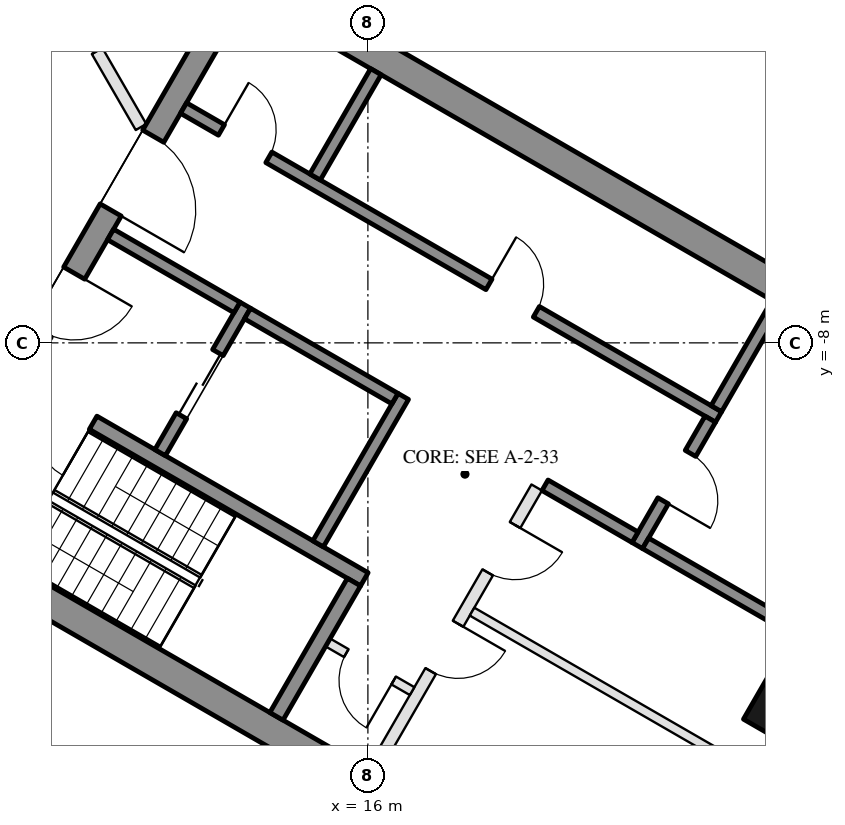
"""IFC4 building model, lengths in metres.
Left out: names, types, materials, properties, quantities, classifications, styles, units other than length and angle.
Written with IfcOpenShell. Run it as: python <this file> out.ifc"""

import sys

from ifc_helpers import new_model, si_unit, direction, frame, frame_2d, origin, origin_2d, place, context, subcontext, project, spatial, rectangle, hollow_rectangle, extrude, element, fill, save


model = new_model("IFC4")
c1 = context("Model", 3, precision=1e-05, world=origin(), true_north=direction((0.0, 1.0)))
c2 = subcontext(c1, "Body", "Model", "MODEL_VIEW")
j1 = project(units=[si_unit("LENGTHUNIT", "METRE"), si_unit("PLANEANGLEUNIT", "RADIAN")], contexts=[c1])
p1 = place(None, origin())
s1 = spatial("IfcSite", under=j1, at=p1, CompositionType="ELEMENT")
p2 = place(p1, origin())
s2 = spatial("IfcBuilding", under=s1, at=p2, CompositionType="ELEMENT")
p3 = place(p2, frame((0.0, 0.0, 146.6)))
s3 = spatial("IfcBuildingStorey", under=s2, at=p3, CompositionType="ELEMENT", Elevation=146.6)
p4 = place(p3, frame((23.729, -13.7, 0.0), z_axis=(0.0, 0.0, 1.0), x_axis=(0.5, 0.866025403784, 0.0)))
e1 = element("IfcColumn", 1, at=p4, inside=s3, PredefinedType="COLUMN", context=c2, shape_type="SweptSolid", body=[
    extrude(hollow_rectangle(XDim=2.4, YDim=2.2, WallThickness=0.06, at=origin_2d()), origin(), (0.0, 0.0, 1.0), 3.7),
])
p5 = place(p3, frame((26.257, -6.567, 0.0), z_axis=(0.0, 0.0, 1.0), x_axis=(-0.500023526245, 0.866011820475, 0.0)))
e2 = element("IfcWall", 2, at=p5, inside=s3, PredefinedType="SOLIDWALL", context=c2, shape_type="SweptSolid", body=[
    extrude(rectangle(XDim=11.816, YDim=0.35, at=frame_2d((5.908, 0.0))), origin(), (0.0, 0.0, 1.0), 3.55),
])
p6 = place(p5, frame((0.38, 0.0, 0.3)))
e3 = element("IfcOpeningElement", 3, at=p6, cuts=e2, PredefinedType="OPENING", context=c2, shape_type="SweptSolid", body=[
    extrude(rectangle(XDim=1.8, YDim=2.65, at=frame_2d((0.9, 1.325))), frame((0.0, 0.185, 0.0), z_axis=(0.0, -1.0, 0.0), x_axis=(1.0, 0.0, 0.0)), (0.0, 0.0, 1.0), 0.37),
])
p7 = place(p5, frame((7.741, 0.0, 0.0)))
e4 = element("IfcOpeningElement", 4, at=p7, cuts=e2, PredefinedType="OPENING", context=c2, shape_type="SweptSolid", body=[
    extrude(rectangle(XDim=2.4, YDim=2.4, at=frame_2d((1.2, 1.2))), frame((0.0, 0.185, 0.0), z_axis=(0.0, -1.0, 0.0), x_axis=(1.0, 0.0, 0.0)), (0.0, 0.0, 1.0), 0.37),
])
p8 = place(p5, frame((3.791, 0.0, 0.3)))
e5 = element("IfcOpeningElement", 5, at=p8, cuts=e2, PredefinedType="OPENING", context=c2, shape_type="SweptSolid", body=[
    extrude(rectangle(XDim=1.6, YDim=2.65, at=frame_2d((0.8, 1.325))), frame((0.0, 0.185, 0.0), z_axis=(0.0, -1.0, 0.0), x_axis=(1.0, 0.0, 0.0)), (0.0, 0.0, 1.0), 0.37),
])
p9 = place(p5, frame((5.691, 0.0, 0.3)))
e6 = element("IfcOpeningElement", 6, at=p9, cuts=e2, PredefinedType="OPENING", context=c2, shape_type="SweptSolid", body=[
    extrude(rectangle(XDim=1.6, YDim=2.65, at=frame_2d((0.8, 1.325))), frame((0.0, 0.185, 0.0), z_axis=(0.0, -1.0, 0.0), x_axis=(1.0, 0.0, 0.0)), (0.0, 0.0, 1.0), 0.37),
])
for number, where, z_axis, x_axis in (
    (7, (8.547, -10.997, 0.0), (0.0, 0.0, 1.0), (0.866, -0.5, 0.0)),
    (8, (13.797, -1.903, 0.0), (0.0, 0.0, 1.0), (0.866, -0.5, 0.0)),
):
    element("IfcWall", number, at=place(p3, frame(where, z_axis=z_axis, x_axis=x_axis)), inside=s3, PredefinedType="SHEAR", context=c2, shape_type="SweptSolid", body=[
        extrude(rectangle(XDim=14.837, YDim=0.5, at=frame_2d((7.418, 0.0))), origin(), (0.0, 0.0, 1.0), 3.5),
    ])
p10 = place(p3, frame((8.845, -10.88, 0.0), z_axis=(0.0, 0.0, 1.0), x_axis=(0.500004234368, 0.866022959057, 0.0)))
e9 = element("IfcWall", 9, at=p10, inside=s3, PredefinedType="SHEAR", context=c2, shape_type="SweptSolid", body=[
    extrude(rectangle(XDim=10.0, YDim=0.4, at=frame_2d((5.0, 0.0))), origin(), (0.0, 0.0, 1.0), 3.5),
])
p11 = place(p10, frame((3.55, 0.0, 0.0)))
e10 = element("IfcOpeningElement", 10, at=p11, cuts=e9, PredefinedType="OPENING", context=c2, shape_type="SweptSolid", body=[
    extrude(rectangle(XDim=1.1, YDim=2.1, at=frame_2d((0.55, 1.05))), frame((0.0, 0.21, 0.0), z_axis=(0.0, -1.0, 0.0), x_axis=(1.0, 0.0, 0.0)), (0.0, 0.0, 1.0), 0.42),
])
p12 = place(p10, frame((5.85, 0.0, 0.0)))
e11 = element("IfcOpeningElement", 11, at=p12, cuts=e9, PredefinedType="OPENING", context=c2, shape_type="SweptSolid", body=[
    extrude(rectangle(XDim=1.4, YDim=2.1, at=frame_2d((0.7, 1.05))), frame((0.0, 0.21, 0.0), z_axis=(0.0, -1.0, 0.0), x_axis=(1.0, 0.0, 0.0)), (0.0, 0.0, 1.0), 0.42),
])
p13 = place(p3, frame((10.356, -8.664, 0.0), z_axis=(0.0, 0.0, 1.0), x_axis=(0.866028629588, -0.499994412703, 0.0)))
e12 = element("IfcWall", 12, at=p13, inside=s3, PredefinedType="SHEAR", context=c2, shape_type="SweptSolid", body=[
    extrude(rectangle(XDim=6.45, YDim=0.25, at=frame_2d((3.225, 0.0))), origin(), (0.0, 0.0, 1.0), 3.5),
])
p14 = place(p13, frame((0.3, 0.0, 0.0)))
e13 = element("IfcOpeningElement", 13, at=p14, cuts=e12, PredefinedType="OPENING", context=c2, shape_type="SweptSolid", body=[
    extrude(rectangle(XDim=1.0, YDim=2.1, at=frame_2d((0.5, 1.05))), frame((0.0, 0.135, 0.0), z_axis=(0.0, -1.0, 0.0), x_axis=(1.0, 0.0, 0.0)), (0.0, 0.0, 1.0), 0.27),
])
p15 = place(p3, frame((14.496, -14.143, 0.0), z_axis=(0.0, 0.0, 1.0), x_axis=(0.500062241894, 0.865989465428, 0.0)))
e14 = element("IfcWall", 14, at=p15, inside=s3, PredefinedType="SHEAR", context=c2, shape_type="SweptSolid", body=[
    extrude(rectangle(XDim=2.55, YDim=0.25, at=frame_2d((1.275, 0.0))), origin(), (0.0, 0.0, 1.0), 3.5),
])
p16 = place(p3, frame((15.181, -11.305, 0.0), z_axis=(0.0, 0.0, 1.0), x_axis=(0.49994636267, 0.866056369097, 0.0)))
e15 = element("IfcWall", 15, at=p16, inside=s3, PredefinedType="SHEAR", context=c2, shape_type="SweptSolid", body=[
    extrude(rectangle(XDim=2.8, YDim=0.2, at=frame_2d((1.4, 0.0))), origin(), (0.0, 0.0, 1.0), 3.5),
])
p17 = place(p3, frame((12.583, -9.805, 0.0), z_axis=(0.0, 0.0, 1.0), x_axis=(0.49994636267, 0.866056369097, 0.0)))
e16 = element("IfcWall", 16, at=p17, inside=s3, PredefinedType="SHEAR", context=c2, shape_type="SweptSolid", body=[
    extrude(rectangle(XDim=2.8, YDim=0.2, at=frame_2d((1.4, 0.0))), origin(), (0.0, 0.0, 1.0), 3.5),
])
p18 = place(p17, frame((0.7, 0.0, 0.0)))
e17 = element("IfcOpeningElement", 17, at=p18, cuts=e16, PredefinedType="OPENING", context=c2, shape_type="SweptSolid", body=[
    extrude(rectangle(XDim=1.2, YDim=2.1, at=frame_2d((0.6, 1.05))), frame((0.0, 0.11, 0.0), z_axis=(0.0, -1.0, 0.0), x_axis=(1.0, 0.0, 0.0)), (0.0, 0.0, 1.0), 0.22),
])
p19 = place(p3, frame((11.768, -6.217, 0.0), z_axis=(0.0, 0.0, 1.0), x_axis=(0.866050077142, -0.499957262057, 0.0)))
e18 = element("IfcWall", 18, at=p19, inside=s3, PredefinedType="SHEAR", context=c2, shape_type="SweptSolid", body=[
    extrude(rectangle(XDim=2.4, YDim=0.2, at=frame_2d((1.2, 0.0))), origin(), (0.0, 0.0, 1.0), 3.5),
])
p20 = place(p3, frame((14.02, -7.517, 0.0), z_axis=(0.0, 0.0, 1.0), x_axis=(0.866034573852, -0.49998411664, 0.0)))
e19 = element("IfcWall", 19, at=p20, inside=s3, PredefinedType="SHEAR", context=c2, shape_type="SweptSolid", body=[
    extrude(rectangle(XDim=2.8, YDim=0.2, at=frame_2d((1.4, 0.0))), origin(), (0.0, 0.0, 1.0), 3.5),
])
p21 = place(p3, frame((12.968, -4.138, 0.0), z_axis=(0.0, 0.0, 1.0), x_axis=(0.866028328073, -0.49999493495, 0.0)))
e20 = element("IfcWall", 20, at=p21, inside=s3, PredefinedType="SHEAR", context=c2, shape_type="SweptSolid", body=[
    extrude(rectangle(XDim=10.16, YDim=0.2, at=frame_2d((5.08, 0.0))), origin(), (0.0, 0.0, 1.0), 3.5),
])
p22 = place(p21, frame((0.72, 0.0, 0.0)))
e21 = element("IfcOpeningElement", 21, at=p22, cuts=e20, PredefinedType="OPENING", context=c2, shape_type="SweptSolid", body=[
    extrude(rectangle(XDim=0.9, YDim=2.1, at=frame_2d((0.45, 1.05))), frame((0.0, 0.11, 0.0), z_axis=(0.0, -1.0, 0.0), x_axis=(1.0, 0.0, 0.0)), (0.0, 0.0, 1.0), 0.22),
])
p23 = place(p21, frame((5.8, 0.0, 0.0)))
e22 = element("IfcOpeningElement", 22, at=p23, cuts=e20, PredefinedType="OPENING", context=c2, shape_type="SweptSolid", body=[
    extrude(rectangle(XDim=0.9, YDim=2.1, at=frame_2d((0.45, 1.05))), frame((0.0, 0.11, 0.0), z_axis=(0.0, -1.0, 0.0), x_axis=(1.0, 0.0, 0.0)), (0.0, 0.0, 1.0), 0.22),
])
p24 = place(p3, frame((20.43, -11.333, 0.0), z_axis=(0.0, 0.0, 1.0), x_axis=(0.500001309137, 0.866024647952, 0.0)))
e23 = element("IfcWall", 23, at=p24, inside=s3, PredefinedType="SHEAR", context=c2, shape_type="SweptSolid", body=[
    extrude(rectangle(XDim=2.4, YDim=0.2, at=frame_2d((1.2, 0.0))), origin(), (0.0, 0.0, 1.0), 3.5),
])
p25 = place(p24, frame((0.85, 0.0, 0.0)))
e24 = element("IfcOpeningElement", 24, at=p25, cuts=e23, PredefinedType="OPENING", context=c2, shape_type="SweptSolid", body=[
    extrude(rectangle(XDim=0.9, YDim=2.1, at=frame_2d((0.45, 1.05))), frame((0.0, 0.11, 0.0), z_axis=(0.0, -1.0, 0.0), x_axis=(1.0, 0.0, 0.0)), (0.0, 0.0, 1.0), 0.22),
])
p26 = place(p3, frame((18.913, -10.342, 0.0), z_axis=(0.0, 0.0, 1.0), x_axis=(0.866038183914, -0.499977863513, 0.0)))
e25 = element("IfcWall", 25, at=p26, inside=s3, PredefinedType="SHEAR", context=c2, shape_type="SweptSolid", body=[
    extrude(rectangle(XDim=1.71, YDim=0.2, at=frame_2d((0.855, 0.0))), origin(), (0.0, 0.0, 1.0), 3.5),
])
for number, where, z_axis, x_axis in (
    (26, (15.131, -5.272, 0.0), (0.0, 0.0, 1.0), (0.5, 0.866, 0.0)),
    (27, (21.73, -9.082, 0.0), (0.0, 0.0, 1.0), (0.5, 0.866, 0.0)),
):
    element("IfcWall", number, at=place(p3, frame(where, z_axis=z_axis, x_axis=x_axis)), inside=s3, PredefinedType="SHEAR", context=c2, shape_type="SweptSolid", body=[
        extrude(rectangle(XDim=2.0, YDim=0.2, at=frame_2d((1.0, 0.0))), origin(), (0.0, 0.0, 1.0), 3.5),
    ])
p27 = place(p3, frame((20.567, -11.297, 0.0), z_axis=(0.0, 0.0, 1.0), x_axis=(0.866055327414, -0.49994816717, 0.0)))
e28 = element("IfcWall", 28, at=p27, inside=s3, PredefinedType="SHEAR", context=c2, shape_type="SweptSolid", body=[
    extrude(rectangle(XDim=2.84, YDim=0.2, at=frame_2d((1.42, 0.0))), origin(), (0.0, 0.0, 1.0), 3.5),
])
p28 = place(p3, frame((16.076, -15.055, 0.0), z_axis=(0.0, 0.0, 1.0), x_axis=(0.499995103361, 0.866028230842, 0.0)))
e29 = element("IfcWall", 29, at=p28, inside=s3, PredefinedType="PARTITIONING", context=c2, shape_type="SweptSolid", body=[
    extrude(rectangle(XDim=5.4, YDim=0.2, at=frame_2d((2.7, 0.0))), origin(), (0.0, 0.0, 1.0), 3.5),
])
p29 = place(p28, frame((1.913, 0.0, 0.0)))
e30 = element("IfcOpeningElement", 30, at=p29, cuts=e29, PredefinedType="OPENING", context=c2, shape_type="SweptSolid", body=[
    extrude(rectangle(XDim=0.9, YDim=2.1, at=frame_2d((0.45, 1.05))), frame((0.0, 0.11, 0.0), z_axis=(0.0, -1.0, 0.0), x_axis=(1.0, 0.0, 0.0)), (0.0, 0.0, 1.0), 0.22),
])
p30 = place(p28, frame((3.788, 0.0, 0.0)))
e31 = element("IfcOpeningElement", 31, at=p30, cuts=e29, PredefinedType="OPENING", context=c2, shape_type="SweptSolid", body=[
    extrude(rectangle(XDim=0.9, YDim=2.1, at=frame_2d((0.45, 1.05))), frame((0.0, 0.11, 0.0), z_axis=(0.0, -1.0, 0.0), x_axis=(1.0, 0.0, 0.0)), (0.0, 0.0, 1.0), 0.22),
])
p31 = place(p3, frame((15.342, -12.928, 0.0), z_axis=(0.0, 0.0, 1.0), x_axis=(0.865989903783, -0.500061482766, 0.0)))
e32 = element("IfcWall", 32, at=p31, inside=s3, PredefinedType="PARTITIONING", context=c2, shape_type="SweptSolid", body=[
    extrude(rectangle(XDim=1.6, YDim=0.15, at=frame_2d((0.8, 0.0))), origin(), (0.0, 0.0, 1.0), 3.5),
])
p32 = place(p31, frame((0.35, 0.0, 0.0)))
e33 = element("IfcOpeningElement", 33, at=p32, cuts=e32, PredefinedType="OPENING", context=c2, shape_type="SweptSolid", body=[
    extrude(rectangle(XDim=0.9, YDim=2.1, at=frame_2d((0.45, 1.05))), frame((0.0, 0.085, 0.0), z_axis=(0.0, -1.0, 0.0), x_axis=(1.0, 0.0, 0.0)), (0.0, 0.0, 1.0), 0.17),
])
p33 = place(p3, frame((17.713, -12.42, 0.0), z_axis=(0.0, 0.0, 1.0), x_axis=(0.866016523273, -0.500015381182, 0.0)))
e34 = element("IfcWall", 34, at=p33, inside=s3, PredefinedType="PARTITIONING", context=c2, shape_type="SweptSolid", body=[
    extrude(rectangle(XDim=6.95, YDim=0.15, at=frame_2d((3.475, 0.0))), origin(), (0.0, 0.0, 1.0), 3.5),
])
p34 = place(p3, frame((10.325, -1.083, 0.0), z_axis=(0.0, 0.0, 1.0), x_axis=(0.500008716408, -0.866020371305, 0.0)))
e35 = element("IfcWall", 35, at=p34, inside=s3, PredefinedType="PARTITIONING", context=c2, shape_type="SweptSolid", body=[
    extrude(rectangle(XDim=3.888, YDim=0.2, at=frame_2d((1.944, 0.0))), origin(), (0.0, 0.0, 1.0), 2.95),
])
p35 = place(p34, frame((1.444, 0.0, 0.0)))
e36 = element("IfcOpeningElement", 36, at=p35, cuts=e35, PredefinedType="OPENING", context=c2, shape_type="SweptSolid", body=[
    extrude(rectangle(XDim=1.0, YDim=2.1, at=frame_2d((0.5, 1.05))), frame((0.0, 0.11, 0.0), z_axis=(0.0, -1.0, 0.0), x_axis=(1.0, 0.0, 0.0)), (0.0, 0.0, 1.0), 0.22),
])
p36 = place(p18, origin())
e37 = element("IfcDoor", 37, at=p36, inside=s3, OperationType="DOUBLE_DOOR_SLIDING", PredefinedType="DOOR", context=c2, shape_type="SweptSolid", body=[
    extrude(rectangle(XDim=1.2, YDim=2.1, at=frame_2d((0.6, 1.05))), frame((0.0, 0.025, 0.0), z_axis=(0.0, -1.0, 0.0), x_axis=(1.0, 0.0, 0.0)), (0.0, 0.0, 1.0), 0.05),
])
fill(e17, e37)
p37 = place(p32, frame((0.9, 0.0, 0.0), z_axis=(0.0, 0.0, 1.0), x_axis=(-1.0, 0.0, 0.0)))
e38 = element("IfcDoor", 38, at=p37, inside=s3, OperationType="SINGLE_SWING_LEFT", PredefinedType="DOOR", context=c2, shape_type="SweptSolid", body=[
    extrude(rectangle(XDim=0.9, YDim=2.1, at=frame_2d((0.45, 1.05))), frame((0.0, 0.025, 0.0), z_axis=(0.0, -1.0, 0.0), x_axis=(1.0, 0.0, 0.0)), (0.0, 0.0, 1.0), 0.05),
])
fill(e33, e38)
p38 = place(p22, origin())
e39 = element("IfcDoor", 39, at=p38, inside=s3, OperationType="SINGLE_SWING_LEFT", PredefinedType="DOOR", context=c2, shape_type="SweptSolid", body=[
    extrude(rectangle(XDim=0.9, YDim=2.1, at=frame_2d((0.45, 1.05))), frame((0.0, 0.025, 0.0), z_axis=(0.0, -1.0, 0.0), x_axis=(1.0, 0.0, 0.0)), (0.0, 0.0, 1.0), 0.05),
])
fill(e21, e39)
p39 = place(p23, origin())
e40 = element("IfcDoor", 40, at=p39, inside=s3, OperationType="SINGLE_SWING_LEFT", PredefinedType="DOOR", context=c2, shape_type="SweptSolid", body=[
    extrude(rectangle(XDim=0.9, YDim=2.1, at=frame_2d((0.45, 1.05))), frame((0.0, 0.025, 0.0), z_axis=(0.0, -1.0, 0.0), x_axis=(1.0, 0.0, 0.0)), (0.0, 0.0, 1.0), 0.05),
])
fill(e22, e40)
p40 = place(p25, frame((0.9, 0.0, 0.0), z_axis=(0.0, 0.0, 1.0), x_axis=(-1.0, 0.0, 0.0)))
e41 = element("IfcDoor", 41, at=p40, inside=s3, OperationType="SINGLE_SWING_RIGHT", PredefinedType="DOOR", context=c2, shape_type="SweptSolid", body=[
    extrude(rectangle(XDim=0.9, YDim=2.1, at=frame_2d((0.45, 1.05))), frame((0.0, 0.025, 0.0), z_axis=(0.0, -1.0, 0.0), x_axis=(1.0, 0.0, 0.0)), (0.0, 0.0, 1.0), 0.05),
])
fill(e24, e41)
p41 = place(p29, frame((0.9, 0.0, 0.0), z_axis=(0.0, 0.0, 1.0), x_axis=(-1.0, 0.0, 0.0)))
e42 = element("IfcDoor", 42, at=p41, inside=s3, OperationType="SINGLE_SWING_LEFT", PredefinedType="DOOR", context=c2, shape_type="SweptSolid", body=[
    extrude(rectangle(XDim=0.9, YDim=2.1, at=frame_2d((0.45, 1.05))), frame((0.0, 0.025, 0.0), z_axis=(0.0, -1.0, 0.0), x_axis=(1.0, 0.0, 0.0)), (0.0, 0.0, 1.0), 0.05),
])
fill(e30, e42)
p42 = place(p30, frame((0.9, 0.0, 0.0), z_axis=(0.0, 0.0, 1.0), x_axis=(-1.0, 0.0, 0.0)))
e43 = element("IfcDoor", 43, at=p42, inside=s3, OperationType="SINGLE_SWING_LEFT", PredefinedType="DOOR", context=c2, shape_type="SweptSolid", body=[
    extrude(rectangle(XDim=0.9, YDim=2.1, at=frame_2d((0.45, 1.05))), frame((0.0, 0.025, 0.0), z_axis=(0.0, -1.0, 0.0), x_axis=(1.0, 0.0, 0.0)), (0.0, 0.0, 1.0), 0.05),
])
fill(e31, e43)
p43 = place(p11, frame((1.1, 0.0, 0.0), z_axis=(0.0, 0.0, 1.0), x_axis=(-1.0, 0.0, 0.0)))
e44 = element("IfcDoor", 44, at=p43, inside=s3, OperationType="SINGLE_SWING_LEFT", PredefinedType="DOOR", context=c2, shape_type="SweptSolid", body=[
    extrude(rectangle(XDim=1.1, YDim=2.1, at=frame_2d((0.55, 1.05))), frame((0.0, 0.025, 0.0), z_axis=(0.0, -1.0, 0.0), x_axis=(1.0, 0.0, 0.0)), (0.0, 0.0, 1.0), 0.05),
])
fill(e10, e44)
p44 = place(p12, frame((1.4, 0.0, 0.0), z_axis=(0.0, 0.0, 1.0), x_axis=(-1.0, 0.0, 0.0)))
e45 = element("IfcDoor", 45, at=p44, inside=s3, OperationType="DOUBLE_DOOR_SINGLE_SWING", PredefinedType="DOOR", context=c2, shape_type="SweptSolid", body=[
    extrude(rectangle(XDim=1.4, YDim=2.1, at=frame_2d((0.7, 1.05))), frame((0.0, 0.025, 0.0), z_axis=(0.0, -1.0, 0.0), x_axis=(1.0, 0.0, 0.0)), (0.0, 0.0, 1.0), 0.05),
])
fill(e11, e45)
p45 = place(p14, frame((1.0, 0.0, 0.0), z_axis=(0.0, 0.0, 1.0), x_axis=(-1.0, 0.0, 0.0)))
e46 = element("IfcDoor", 46, at=p45, inside=s3, OperationType="SINGLE_SWING_LEFT", PredefinedType="DOOR", context=c2, shape_type="SweptSolid", body=[
    extrude(rectangle(XDim=1.0, YDim=2.1, at=frame_2d((0.5, 1.05))), frame((0.0, 0.025, 0.0), z_axis=(0.0, -1.0, 0.0), x_axis=(1.0, 0.0, 0.0)), (0.0, 0.0, 1.0), 0.05),
])
fill(e13, e46)
save(model, sys.argv[1])
